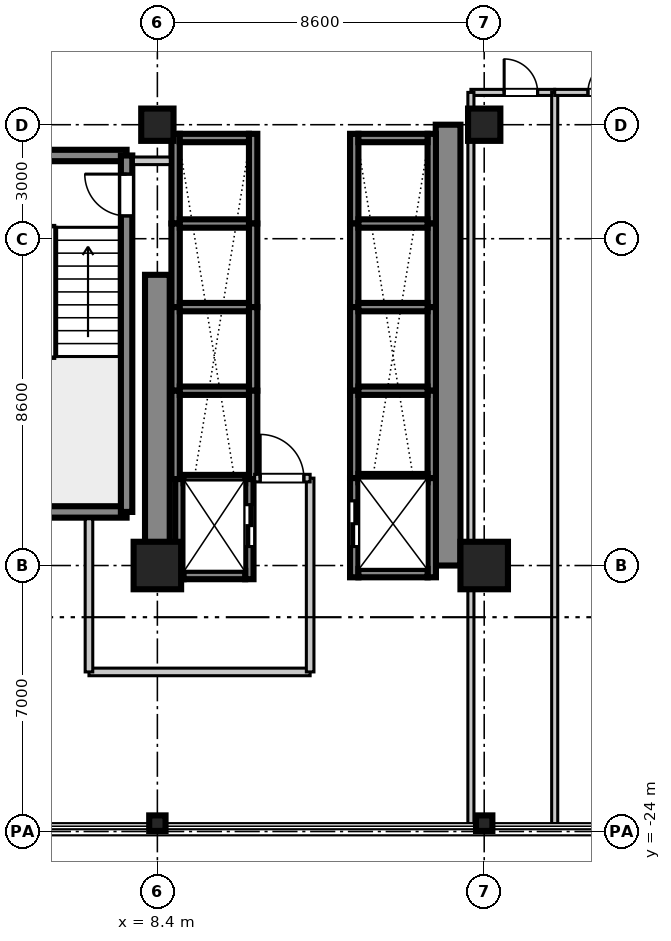
"""IFC4 building model, lengths in metres.
Left out: names, types, materials, properties, quantities, classifications, styles, units other than length and angle.
Written with IfcOpenShell. Run it as: python <this file> out.ifc"""

import sys

from ifc_helpers import new_model, si_unit, direction, frame, frame_2d, origin, origin_2d, place, context, subcontext, project, spatial, rectangle, i_section, extrude, source, transform, mapped, element, fill, save


model = new_model("IFC4")
c1 = context("Model", 3, precision=1e-05, world=origin(), true_north=direction((0.0, 1.0)))
c2 = subcontext(c1, "Body", "Model", "MODEL_VIEW")
j1 = project(units=[si_unit("LENGTHUNIT", "METRE"), si_unit("PLANEANGLEUNIT", "RADIAN")], contexts=[c1])
p1 = place(None, origin())
s1 = spatial("IfcSite", under=j1, at=p1, CompositionType="ELEMENT")
p2 = place(p1, origin())
s2 = spatial("IfcBuilding", under=s1, at=p2, CompositionType="ELEMENT")
p3 = place(p2, frame((0.0, 0.0, 102.9)))
s3 = spatial("IfcBuildingStorey", under=s2, at=p3, CompositionType="ELEMENT", Elevation=102.9)
m1 = source(origin(), c2, "Body", "SweptSolid", [
    extrude(rectangle(XDim=1.25, YDim=1.25, at=origin_2d()), origin(), (0.0, 0.0, 1.0), 3.605),
])
p4 = place(p3, frame((8.4, -17.0, 0.0), z_axis=(0.0, 0.0, 1.0), x_axis=(1.0, 0.0, 0.0)))
e1 = element("IfcColumn", 1, at=p4, inside=s3, PredefinedType="COLUMN", context=c2, shape_type="MappedRepresentation", body=[
    mapped(m1, transform((0.0, 0.0, 0.0), scale=1.0)),
])
m2 = source(origin(), c2, "Body", "SweptSolid", [
    extrude(rectangle(XDim=0.85, YDim=0.85, at=origin_2d()), origin(), (0.0, 0.0, 1.0), 3.605),
])
p5 = place(p3, frame((8.4, -5.4, 0.0), z_axis=(0.0, 0.0, 1.0), x_axis=(1.0, 0.0, 0.0)))
e2 = element("IfcColumn", 2, at=p5, inside=s3, PredefinedType="PILASTER", context=c2, shape_type="MappedRepresentation", body=[
    mapped(m2, transform((0.0, 0.0, 0.0), scale=1.0)),
])
p6 = place(p3, frame((17.0, -17.0, 0.0), z_axis=(0.0, 0.0, 1.0), x_axis=(1.0, 0.0, 0.0)))
e3 = element("IfcColumn", 3, at=p6, inside=s3, PredefinedType="COLUMN", context=c2, shape_type="MappedRepresentation", body=[
    mapped(m1, transform((0.0, 0.0, 0.0), scale=1.0)),
])
p7 = place(p3, frame((17.0, -5.4, 0.0), z_axis=(0.0, 0.0, 1.0), x_axis=(1.0, 0.0, 0.0)))
e4 = element("IfcColumn", 4, at=p7, inside=s3, PredefinedType="PILASTER", context=c2, shape_type="MappedRepresentation", body=[
    mapped(m2, transform((0.0, 0.0, 0.0), scale=1.0)),
])
m3 = source(origin(), c2, "Body", "SweptSolid", [
    extrude(i_section(OverallWidth=0.409, OverallDepth=0.43, WebThickness=0.021, FlangeThickness=0.034, at=origin_2d()), origin(), (0.0, 0.0, 1.0), 3.605),
])
for number, where, z_axis, x_axis in (
    (5, (8.4, -23.78, 0.0), (0.0, 0.0, 1.0), (0.0, 1.0, 0.0)),
    (6, (17.0, -23.78, 0.0), (0.0, 0.0, 1.0), (0.0, 1.0, 0.0)),
):
    element("IfcColumn", number, at=place(p3, frame(where, z_axis=z_axis, x_axis=x_axis)), inside=s3, PredefinedType="COLUMN", context=c2, shape_type="MappedRepresentation", body=[
        mapped(m3, transform((0.0, 0.0, 0.0), scale=1.0)),
    ])
m4 = source(origin(), c2, "Body", "SweptSolid", [
    extrude(rectangle(XDim=7.65, YDim=0.65, at=frame_2d((3.825, 0.0))), origin(), (0.0, 0.0, 1.0), 3.38),
])
p8 = place(p3, frame((8.4, -17.0, 0.0), z_axis=(0.0, 0.0, 1.0), x_axis=(0.0, 1.0, 0.0)))
e7 = element("IfcWall", 7, at=p8, inside=s3, PredefinedType="SHEAR", context=c2, shape_type="MappedRepresentation", body=[
    mapped(m4, transform((0.0, 0.0, 0.0), scale=1.0)),
])
m5 = source(origin(), c2, "Body", "SweptSolid", [
    extrude(rectangle(XDim=11.6, YDim=0.65, at=frame_2d((5.8, 0.0))), origin(), (0.0, 0.0, 1.0), 3.38),
])
p9 = place(p3, frame((16.05, -17.0, 0.0), z_axis=(0.0, 0.0, 1.0), x_axis=(0.0, 1.0, 0.0)))
e8 = element("IfcWall", 8, at=p9, inside=s3, PredefinedType="SHEAR", context=c2, shape_type="MappedRepresentation", body=[
    mapped(m5, transform((0.0, 0.0, 0.0), scale=1.0)),
])
m6 = source(origin(), c2, "Body", "SweptSolid", [
    extrude(rectangle(XDim=3.98, YDim=0.3, at=frame_2d((1.99, 0.0))), origin(), (0.0, 0.0, 1.0), 3.38),
])
for number, where, z_axis, x_axis in (
    (9, (3.61, -15.59, 0.0), (0.0, 0.0, 1.0), (1.0, 0.0, 0.0)),
    (10, (3.61, -6.21, 0.0), (0.0, 0.0, 1.0), (1.0, 0.0, 0.0)),
):
    element("IfcWall", number, at=place(p3, frame(where, z_axis=z_axis, x_axis=x_axis)), inside=s3, PredefinedType="SHEAR", context=c2, shape_type="MappedRepresentation", body=[
        mapped(m6, transform((0.0, 0.0, 0.0), scale=1.0)),
    ])
m7 = source(origin(), c2, "Body", "SweptSolid", [
    extrude(rectangle(XDim=9.38, YDim=0.3, at=frame_2d((4.69, 0.0))), origin(), (0.0, 0.0, 1.0), 3.38),
])
p10 = place(p3, frame((7.59, -15.59, 0.0), z_axis=(0.0, 0.0, 1.0), x_axis=(0.0, 1.0, 0.0)))
e11 = element("IfcWall", 11, at=p10, inside=s3, PredefinedType="SHEAR", context=c2, shape_type="MappedRepresentation", body=[
    mapped(m7, transform((0.0, 0.0, 0.0), scale=1.0)),
])
p11 = place(p10, frame((7.79, 0.0, 0.0)))
e12 = element("IfcOpeningElement", 12, at=p11, cuts=e11, PredefinedType="OPENING", context=c2, shape_type="SweptSolid", body=[
    extrude(rectangle(XDim=1.1, YDim=2.15, at=frame_2d((0.55, 1.075))), frame((0.0, 0.16, 0.0), z_axis=(0.0, -1.0, 0.0), x_axis=(1.0, 0.0, 0.0)), (0.0, 0.0, 1.0), 0.32),
])
m8 = source(origin(), c2, "Body", "SweptSolid", [
    extrude(rectangle(XDim=2.36, YDim=0.22, at=frame_2d((1.18, 0.0))), origin(), (0.0, 0.0, 1.0), 3.38),
])
for number, where, z_axis, x_axis in (
    (13, (13.58, -8.0, 0.0), (0.0, 0.0, 1.0), (0.0, 1.0, 0.0)),
    (14, (15.62, -8.0, 0.0), (0.0, 0.0, 1.0), (0.0, 1.0, 0.0)),
):
    element("IfcWall", number, at=place(p3, frame(where, z_axis=z_axis, x_axis=x_axis)), inside=s3, PredefinedType="SHEAR", context=c2, shape_type="MappedRepresentation", body=[
        mapped(m8, transform((0.0, 0.0, 0.0), scale=1.0)),
    ])
m9 = source(origin(), c2, "Body", "SweptSolid", [
    extrude(rectangle(XDim=1.82, YDim=0.22, at=frame_2d((0.91, 0.0))), origin(), (0.0, 0.0, 1.0), 3.38),
])
p12 = place(p3, frame((13.69, -5.75, 0.0), z_axis=(0.0, 0.0, 1.0), x_axis=(1.0, 0.0, 0.0)))
e15 = element("IfcWall", 15, at=p12, inside=s3, PredefinedType="SHEAR", context=c2, shape_type="MappedRepresentation", body=[
    mapped(m9, transform((0.0, 0.0, 0.0), scale=1.0)),
])
m10 = source(origin(), c2, "Body", "SweptSolid", [
    extrude(rectangle(XDim=2.2, YDim=0.22, at=frame_2d((1.1, 0.0))), origin(), (0.0, 0.0, 1.0), 3.38),
])
for number, where, z_axis, x_axis in (
    (16, (13.58, -10.2, 0.0), (0.0, 0.0, 1.0), (0.0, 1.0, 0.0)),
    (17, (15.62, -10.2, 0.0), (0.0, 0.0, 1.0), (0.0, 1.0, 0.0)),
):
    element("IfcWall", number, at=place(p3, frame(where, z_axis=z_axis, x_axis=x_axis)), inside=s3, PredefinedType="SHEAR", context=c2, shape_type="MappedRepresentation", body=[
        mapped(m10, transform((0.0, 0.0, 0.0), scale=1.0)),
    ])
m11 = source(origin(), c2, "Body", "SweptSolid", [
    extrude(rectangle(XDim=1.82, YDim=0.22, at=frame_2d((0.91, 0.0))), origin(), (0.0, 0.0, 1.0), 3.65),
])
p13 = place(p3, frame((13.69, -8.0, 0.0), z_axis=(0.0, 0.0, 1.0), x_axis=(1.0, 0.0, 0.0)))
e18 = element("IfcWall", 18, at=p13, inside=s3, PredefinedType="SHEAR", context=c2, shape_type="MappedRepresentation", body=[
    mapped(m11, transform((0.0, 0.0, 0.0), scale=1.0)),
])
for number, where, z_axis, x_axis in (
    (19, (13.58, -12.4, 0.0), (0.0, 0.0, 1.0), (0.0, 1.0, 0.0)),
    (20, (15.62, -12.4, 0.0), (0.0, 0.0, 1.0), (0.0, 1.0, 0.0)),
):
    element("IfcWall", number, at=place(p3, frame(where, z_axis=z_axis, x_axis=x_axis)), inside=s3, PredefinedType="SHEAR", context=c2, shape_type="MappedRepresentation", body=[
        mapped(m10, transform((0.0, 0.0, 0.0), scale=1.0)),
    ])
p14 = place(p3, frame((13.69, -10.2, 0.0), z_axis=(0.0, 0.0, 1.0), x_axis=(1.0, 0.0, 0.0)))
e21 = element("IfcWall", 21, at=p14, inside=s3, PredefinedType="SHEAR", context=c2, shape_type="MappedRepresentation", body=[
    mapped(m11, transform((0.0, 0.0, 0.0), scale=1.0)),
])
m12 = source(origin(), c2, "Body", "SweptSolid", [
    extrude(rectangle(XDim=2.3, YDim=0.22, at=frame_2d((1.15, 0.0))), origin(), (0.0, 0.0, 1.0), 3.38),
])
for number, where, z_axis, x_axis in (
    (22, (13.58, -14.7, 0.0), (0.0, 0.0, 1.0), (0.0, 1.0, 0.0)),
    (23, (15.62, -14.7, 0.0), (0.0, 0.0, 1.0), (0.0, 1.0, 0.0)),
):
    element("IfcWall", number, at=place(p3, frame(where, z_axis=z_axis, x_axis=x_axis)), inside=s3, PredefinedType="SHEAR", context=c2, shape_type="MappedRepresentation", body=[
        mapped(m12, transform((0.0, 0.0, 0.0), scale=1.0)),
    ])
p15 = place(p3, frame((13.69, -12.4, 0.0), z_axis=(0.0, 0.0, 1.0), x_axis=(1.0, 0.0, 0.0)))
e24 = element("IfcWall", 24, at=p15, inside=s3, PredefinedType="SHEAR", context=c2, shape_type="MappedRepresentation", body=[
    mapped(m11, transform((0.0, 0.0, 0.0), scale=1.0)),
])
for number, where, z_axis, x_axis in (
    (25, (8.88, -8.0, 0.0), (0.0, 0.0, 1.0), (0.0, 1.0, 0.0)),
    (26, (10.92, -8.0, 0.0), (0.0, 0.0, 1.0), (0.0, 1.0, 0.0)),
):
    element("IfcWall", number, at=place(p3, frame(where, z_axis=z_axis, x_axis=x_axis)), inside=s3, PredefinedType="SHEAR", context=c2, shape_type="MappedRepresentation", body=[
        mapped(m8, transform((0.0, 0.0, 0.0), scale=1.0)),
    ])
p16 = place(p3, frame((8.99, -5.75, 0.0), z_axis=(0.0, 0.0, 1.0), x_axis=(1.0, 0.0, 0.0)))
e27 = element("IfcWall", 27, at=p16, inside=s3, PredefinedType="SHEAR", context=c2, shape_type="MappedRepresentation", body=[
    mapped(m9, transform((0.0, 0.0, 0.0), scale=1.0)),
])
for number, where, z_axis, x_axis in (
    (28, (8.88, -10.2, 0.0), (0.0, 0.0, 1.0), (0.0, 1.0, 0.0)),
    (29, (10.92, -10.2, 0.0), (0.0, 0.0, 1.0), (0.0, 1.0, 0.0)),
):
    element("IfcWall", number, at=place(p3, frame(where, z_axis=z_axis, x_axis=x_axis)), inside=s3, PredefinedType="SHEAR", context=c2, shape_type="MappedRepresentation", body=[
        mapped(m10, transform((0.0, 0.0, 0.0), scale=1.0)),
    ])
p17 = place(p3, frame((8.99, -8.0, 0.0), z_axis=(0.0, 0.0, 1.0), x_axis=(1.0, 0.0, 0.0)))
e30 = element("IfcWall", 30, at=p17, inside=s3, PredefinedType="SHEAR", context=c2, shape_type="MappedRepresentation", body=[
    mapped(m11, transform((0.0, 0.0, 0.0), scale=1.0)),
])
for number, where, z_axis, x_axis in (
    (31, (8.88, -12.4, 0.0), (0.0, 0.0, 1.0), (0.0, 1.0, 0.0)),
    (32, (10.92, -12.4, 0.0), (0.0, 0.0, 1.0), (0.0, 1.0, 0.0)),
):
    element("IfcWall", number, at=place(p3, frame(where, z_axis=z_axis, x_axis=x_axis)), inside=s3, PredefinedType="SHEAR", context=c2, shape_type="MappedRepresentation", body=[
        mapped(m10, transform((0.0, 0.0, 0.0), scale=1.0)),
    ])
p18 = place(p3, frame((8.99, -10.2, 0.0), z_axis=(0.0, 0.0, 1.0), x_axis=(1.0, 0.0, 0.0)))
e33 = element("IfcWall", 33, at=p18, inside=s3, PredefinedType="SHEAR", context=c2, shape_type="MappedRepresentation", body=[
    mapped(m11, transform((0.0, 0.0, 0.0), scale=1.0)),
])
m13 = source(origin(), c2, "Body", "SweptSolid", [
    extrude(rectangle(XDim=2.325, YDim=0.22, at=frame_2d((1.163, 0.0))), origin(), (0.0, 0.0, 1.0), 3.38),
])
for number, where, z_axis, x_axis in (
    (34, (8.88, -14.725, 0.0), (0.0, 0.0, 1.0), (0.0, 1.0, 0.0)),
    (35, (10.92, -14.725, 0.0), (0.0, 0.0, 1.0), (0.0, 1.0, 0.0)),
):
    element("IfcWall", number, at=place(p3, frame(where, z_axis=z_axis, x_axis=x_axis)), inside=s3, PredefinedType="SHEAR", context=c2, shape_type="MappedRepresentation", body=[
        mapped(m13, transform((0.0, 0.0, 0.0), scale=1.0)),
    ])
p19 = place(p3, frame((8.99, -12.4, 0.0), z_axis=(0.0, 0.0, 1.0), x_axis=(1.0, 0.0, 0.0)))
e36 = element("IfcWall", 36, at=p19, inside=s3, PredefinedType="SHEAR", context=c2, shape_type="MappedRepresentation", body=[
    mapped(m11, transform((0.0, 0.0, 0.0), scale=1.0)),
])
m14 = source(origin(), c2, "Body", "SweptSolid", [
    extrude(rectangle(XDim=2.635, YDim=0.22, at=frame_2d((1.317, 0.0))), origin(), (0.0, 0.0, 1.0), 3.38),
])
p20 = place(p3, frame((8.98, -17.36, 0.0), z_axis=(0.0, 0.0, 1.0), x_axis=(0.0, 1.0, 0.0)))
e37 = element("IfcWall", 37, at=p20, inside=s3, PredefinedType="SHEAR", context=c2, shape_type="MappedRepresentation", body=[
    mapped(m14, transform((0.0, 0.0, 0.0), scale=1.0)),
])
p21 = place(p3, frame((10.82, -17.36, 0.0), z_axis=(0.0, 0.0, 1.0), x_axis=(0.0, 1.0, 0.0)))
e38 = element("IfcWall", 38, at=p21, inside=s3, PredefinedType="SHEAR", context=c2, shape_type="MappedRepresentation", body=[
    mapped(m14, transform((0.0, 0.0, 0.0), scale=1.0)),
])
p22 = place(p21, frame((0.86, 0.0, 0.0)))
e39 = element("IfcOpeningElement", 39, at=p22, cuts=e38, PredefinedType="OPENING", context=c2, shape_type="SweptSolid", body=[
    extrude(rectangle(XDim=1.1, YDim=2.2, at=frame_2d((0.55, 1.1))), frame((0.0, 0.12, 0.0), z_axis=(0.0, -1.0, 0.0), x_axis=(1.0, 0.0, 0.0)), (0.0, 0.0, 1.0), 0.24),
])
m15 = source(origin(), c2, "Body", "SweptSolid", [
    extrude(rectangle(XDim=1.62, YDim=0.22, at=frame_2d((0.81, 0.0))), origin(), (0.0, 0.0, 1.0), 3.38),
])
p23 = place(p3, frame((9.09, -17.25, 0.0), z_axis=(0.0, 0.0, 1.0), x_axis=(1.0, 0.0, 0.0)))
e40 = element("IfcWall", 40, at=p23, inside=s3, PredefinedType="SHEAR", context=c2, shape_type="MappedRepresentation", body=[
    mapped(m15, transform((0.0, 0.0, 0.0), scale=1.0)),
])
m16 = source(origin(), c2, "Body", "SweptSolid", [
    extrude(rectangle(XDim=1.62, YDim=0.22, at=frame_2d((0.81, 0.0))), origin(), (0.0, 0.0, 1.0), 3.65),
])
p24 = place(p3, frame((9.09, -14.725, 0.0), z_axis=(0.0, 0.0, 1.0), x_axis=(1.0, 0.0, 0.0)))
e41 = element("IfcWall", 41, at=p24, inside=s3, PredefinedType="SHEAR", context=c2, shape_type="MappedRepresentation", body=[
    mapped(m16, transform((0.0, 0.0, 0.0), scale=1.0)),
])
m17 = source(origin(), c2, "Body", "SweptSolid", [
    extrude(rectangle(XDim=2.61, YDim=0.22, at=frame_2d((1.305, 0.0))), origin(), (0.0, 0.0, 1.0), 3.38),
])
p25 = place(p3, frame((13.58, -17.31, 0.0), z_axis=(0.0, 0.0, 1.0), x_axis=(0.0, 1.0, 0.0)))
e42 = element("IfcWall", 42, at=p25, inside=s3, PredefinedType="SHEAR", context=c2, shape_type="MappedRepresentation", body=[
    mapped(m17, transform((0.0, 0.0, 0.0), scale=1.0)),
])
p26 = place(p25, frame((0.81, 0.0, 0.0)))
e43 = element("IfcOpeningElement", 43, at=p26, cuts=e42, PredefinedType="OPENING", context=c2, shape_type="SweptSolid", body=[
    extrude(rectangle(XDim=1.2, YDim=2.2, at=frame_2d((0.6, 1.1))), frame((0.0, 0.12, 0.0), z_axis=(0.0, -1.0, 0.0), x_axis=(1.0, 0.0, 0.0)), (0.0, 0.0, 1.0), 0.24),
])
p27 = place(p3, frame((15.62, -17.31, 0.0), z_axis=(0.0, 0.0, 1.0), x_axis=(0.0, 1.0, 0.0)))
e44 = element("IfcWall", 44, at=p27, inside=s3, PredefinedType="SHEAR", context=c2, shape_type="MappedRepresentation", body=[
    mapped(m17, transform((0.0, 0.0, 0.0), scale=1.0)),
])
p28 = place(p3, frame((13.69, -17.2, 0.0), z_axis=(0.0, 0.0, 1.0), x_axis=(1.0, 0.0, 0.0)))
e45 = element("IfcWall", 45, at=p28, inside=s3, PredefinedType="SHEAR", context=c2, shape_type="MappedRepresentation", body=[
    mapped(m9, transform((0.0, 0.0, 0.0), scale=1.0)),
])
p29 = place(p3, frame((13.69, -14.7, 0.0), z_axis=(0.0, 0.0, 1.0), x_axis=(1.0, 0.0, 0.0)))
e46 = element("IfcWall", 46, at=p29, inside=s3, PredefinedType="SHEAR", context=c2, shape_type="MappedRepresentation", body=[
    mapped(m11, transform((0.0, 0.0, 0.0), scale=1.0)),
])
m18 = source(origin(), c2, "Body", "SweptSolid", [
    extrude(rectangle(XDim=5.82, YDim=0.2, at=frame_2d((2.91, 0.0))), origin(), (0.0, 0.0, 1.0), 2.72),
])
p30 = place(p3, frame((6.6, -19.8, 0.0), z_axis=(0.0, 0.0, 1.0), x_axis=(1.0, 0.0, 0.0)))
e47 = element("IfcWall", 47, at=p30, inside=s3, PredefinedType="PARTITIONING", context=c2, shape_type="MappedRepresentation", body=[
    mapped(m18, transform((0.0, 0.0, 0.0), scale=1.0)),
])
m19 = source(origin(), c2, "Body", "SweptSolid", [
    extrude(rectangle(XDim=4.03, YDim=0.2, at=frame_2d((2.015, 0.0))), origin(), (0.0, 0.0, 1.0), 2.72),
])
p31 = place(p3, frame((6.6, -19.8, 0.0), z_axis=(0.0, 0.0, 1.0), x_axis=(0.0, 1.0, 0.0)))
e48 = element("IfcWall", 48, at=p31, inside=s3, PredefinedType="PARTITIONING", context=c2, shape_type="MappedRepresentation", body=[
    mapped(m19, transform((0.0, 0.0, 0.0), scale=1.0)),
])
m20 = source(origin(), c2, "Body", "SweptSolid", [
    extrude(rectangle(XDim=5.1, YDim=0.2, at=frame_2d((2.55, 0.0))), origin(), (0.0, 0.0, 1.0), 2.72),
])
p32 = place(p3, frame((12.42, -19.8, 0.0), z_axis=(0.0, 0.0, 1.0), x_axis=(0.0, 1.0, 0.0)))
e49 = element("IfcWall", 49, at=p32, inside=s3, PredefinedType="PARTITIONING", context=c2, shape_type="MappedRepresentation", body=[
    mapped(m20, transform((0.0, 0.0, 0.0), scale=1.0)),
])
m21 = source(origin(), c2, "Body", "SweptSolid", [
    extrude(rectangle(XDim=1.46, YDim=0.2, at=frame_2d((0.73, 0.0))), origin(), (0.0, 0.0, 1.0), 2.72),
])
p33 = place(p3, frame((10.96, -14.7, 0.0), z_axis=(0.0, 0.0, 1.0), x_axis=(1.0, 0.0, 0.0)))
e50 = element("IfcWall", 50, at=p33, inside=s3, PredefinedType="PARTITIONING", context=c2, shape_type="MappedRepresentation", body=[
    mapped(m21, transform((0.0, 0.0, 0.0), scale=1.0)),
])
p34 = place(p33, frame((0.145, 0.0, 0.0)))
e51 = element("IfcOpeningElement", 51, at=p34, cuts=e50, PredefinedType="OPENING", context=c2, shape_type="SweptSolid", body=[
    extrude(rectangle(XDim=1.15, YDim=2.15, at=frame_2d((0.575, 1.075))), frame((0.0, 0.11, 0.0), z_axis=(0.0, -1.0, 0.0), x_axis=(1.0, 0.0, 0.0)), (0.0, 0.0, 1.0), 0.22),
])
m22 = source(origin(), c2, "Body", "SweptSolid", [
    extrude(rectangle(XDim=0.97, YDim=0.2, at=frame_2d((0.485, 0.0))), origin(), (0.0, 0.0, 1.0), 2.72),
])
p35 = place(p3, frame((7.77, -6.35, 0.0), z_axis=(0.0, 0.0, 1.0), x_axis=(1.0, 0.0, 0.0)))
e52 = element("IfcWall", 52, at=p35, inside=s3, PredefinedType="PARTITIONING", context=c2, shape_type="MappedRepresentation", body=[
    mapped(m22, transform((0.0, 0.0, 0.0), scale=1.0)),
])
m23 = source(origin(), c2, "Body", "SweptSolid", [
    extrude(rectangle(XDim=2.205, YDim=0.16, at=frame_2d((1.103, 0.0))), origin(), (0.0, 0.0, 1.0), 2.72),
])
p36 = place(p3, frame((16.65, -4.55, 0.0), z_axis=(0.0, 0.0, 1.0), x_axis=(1.0, 0.0, 0.0)))
e53 = element("IfcWall", 53, at=p36, inside=s3, PredefinedType="PARTITIONING", context=c2, shape_type="MappedRepresentation", body=[
    mapped(m23, transform((0.0, 0.0, 0.0), scale=1.0)),
])
p37 = place(p36, frame((0.875, 0.0, 0.0)))
e54 = element("IfcOpeningElement", 54, at=p37, cuts=e53, PredefinedType="OPENING", context=c2, shape_type="SweptSolid", body=[
    extrude(rectangle(XDim=0.88, YDim=2.1, at=frame_2d((0.44, 1.05))), frame((0.0, 0.09, 0.0), z_axis=(0.0, -1.0, 0.0), x_axis=(1.0, 0.0, 0.0)), (0.0, 0.0, 1.0), 0.18),
])
m24 = source(origin(), c2, "Body", "SweptSolid", [
    extrude(rectangle(XDim=19.25, YDim=0.16, at=frame_2d((9.625, 0.0))), origin(), (0.0, 0.0, 1.0), 2.72),
])
for number, where, z_axis, x_axis in (
    (55, (16.65, -23.8, 0.0), (0.0, 0.0, 1.0), (0.0, 1.0, 0.0)),
    (56, (18.855, -23.8, 0.0), (0.0, 0.0, 1.0), (0.0, 1.0, 0.0)),
):
    element("IfcWall", number, at=place(p3, frame(where, z_axis=z_axis, x_axis=x_axis)), inside=s3, PredefinedType="PARTITIONING", context=c2, shape_type="MappedRepresentation", body=[
        mapped(m24, transform((0.0, 0.0, 0.0), scale=1.0)),
    ])
p38 = place(p3, frame((18.855, -4.55, 0.0), z_axis=(0.0, 0.0, 1.0), x_axis=(1.0, 0.0, 0.0)))
e57 = element("IfcWall", 57, at=p38, inside=s3, PredefinedType="PARTITIONING", context=c2, shape_type="MappedRepresentation", body=[
    mapped(m23, transform((0.0, 0.0, 0.0), scale=1.0)),
])
p39 = place(p38, frame((0.875, 0.0, 0.0)))
e58 = element("IfcOpeningElement", 58, at=p39, cuts=e57, PredefinedType="OPENING", context=c2, shape_type="SweptSolid", body=[
    extrude(rectangle(XDim=0.88, YDim=2.1, at=frame_2d((0.44, 1.05))), frame((0.0, 0.09, 0.0), z_axis=(0.0, -1.0, 0.0), x_axis=(1.0, 0.0, 0.0)), (0.0, 0.0, 1.0), 0.18),
])
m25 = source(origin(), c2, "Body", "SweptSolid", [
    extrude(rectangle(XDim=1.1, YDim=2.15, at=frame_2d((0.55, 1.075))), frame((0.0, 0.025, 0.0), z_axis=(0.0, -1.0, 0.0), x_axis=(1.0, 0.0, 0.0)), (0.0, 0.0, 1.0), 0.05),
])
p40 = place(p11, origin())
e59 = element("IfcDoor", 59, at=p40, inside=s3, OperationType="SINGLE_SWING_RIGHT", PredefinedType="DOOR", context=c2, shape_type="MappedRepresentation", body=[
    mapped(m25, transform((0.0, 0.0, 0.0), scale=1.0)),
])
fill(e12, e59)
m26 = source(origin(), c2, "Body", "SweptSolid", [
    extrude(rectangle(XDim=1.1, YDim=2.2, at=frame_2d((0.55, 1.1))), frame((0.0, 0.025, 0.0), z_axis=(0.0, -1.0, 0.0), x_axis=(1.0, 0.0, 0.0)), (0.0, 0.0, 1.0), 0.05),
])
p41 = place(p22, frame((1.1, 0.0, 0.0), z_axis=(0.0, 0.0, 1.0), x_axis=(-1.0, 0.0, 0.0)))
e60 = element("IfcDoor", 60, at=p41, inside=s3, OperationType="DOUBLE_DOOR_SLIDING", PredefinedType="DOOR", context=c2, shape_type="MappedRepresentation", body=[
    mapped(m26, transform((0.0, 0.0, 0.0), scale=1.0)),
])
fill(e39, e60)
m27 = source(origin(), c2, "Body", "SweptSolid", [
    extrude(rectangle(XDim=1.2, YDim=2.2, at=frame_2d((0.6, 1.1))), frame((0.0, 0.025, 0.0), z_axis=(0.0, -1.0, 0.0), x_axis=(1.0, 0.0, 0.0)), (0.0, 0.0, 1.0), 0.05),
])
p42 = place(p26, origin())
e61 = element("IfcDoor", 61, at=p42, inside=s3, OperationType="DOUBLE_DOOR_SLIDING", PredefinedType="DOOR", context=c2, shape_type="MappedRepresentation", body=[
    mapped(m27, transform((0.0, 0.0, 0.0), scale=1.0)),
])
fill(e43, e61)
m28 = source(origin(), c2, "Body", "SweptSolid", [
    extrude(rectangle(XDim=1.15, YDim=2.15, at=frame_2d((0.575, 1.075))), frame((0.0, 0.025, 0.0), z_axis=(0.0, -1.0, 0.0), x_axis=(1.0, 0.0, 0.0)), (0.0, 0.0, 1.0), 0.05),
])
p43 = place(p34, origin())
e62 = element("IfcDoor", 62, at=p43, inside=s3, OperationType="SINGLE_SWING_LEFT", PredefinedType="DOOR", context=c2, shape_type="MappedRepresentation", body=[
    mapped(m28, transform((0.0, 0.0, 0.0), scale=1.0)),
])
fill(e51, e62)
m29 = source(origin(), c2, "Body", "SweptSolid", [
    extrude(rectangle(XDim=0.88, YDim=2.1, at=frame_2d((0.44, 1.05))), frame((0.0, 0.025, 0.0), z_axis=(0.0, -1.0, 0.0), x_axis=(1.0, 0.0, 0.0)), (0.0, 0.0, 1.0), 0.05),
])
p44 = place(p37, frame((0.88, 0.0, 0.0), z_axis=(0.0, 0.0, 1.0), x_axis=(-1.0, 0.0, 0.0)))
e63 = element("IfcDoor", 63, at=p44, inside=s3, OperationType="SINGLE_SWING_LEFT", PredefinedType="DOOR", context=c2, shape_type="MappedRepresentation", body=[
    mapped(m29, transform((0.0, 0.0, 0.0), scale=1.0)),
])
fill(e54, e63)
p45 = place(p39, frame((0.88, 0.0, 0.0), z_axis=(0.0, 0.0, 1.0), x_axis=(-1.0, 0.0, 0.0)))
e64 = element("IfcDoor", 64, at=p45, inside=s3, OperationType="SINGLE_SWING_RIGHT", PredefinedType="DOOR", context=c2, shape_type="MappedRepresentation", body=[
    mapped(m29, transform((0.0, 0.0, 0.0), scale=1.0)),
])
fill(e58, e64)
save(model, sys.argv[1])
